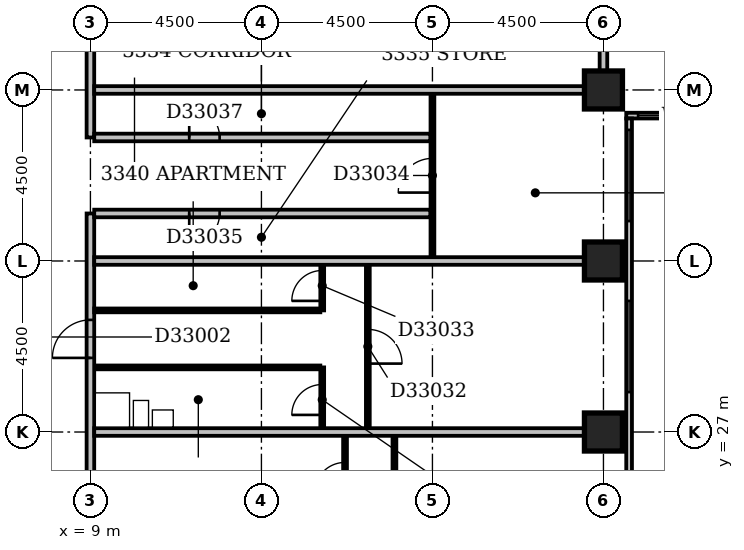
"""IFC4 building model, lengths in metres.
Left out: names, types, materials, properties, quantities, classifications, styles, units other than length and angle.
Written with IfcOpenShell. Run it as: python <this file> out.ifc"""

import sys

from ifc_helpers import new_model, si_unit, direction, frame, frame_2d, origin, origin_2d, place, context, subcontext, project, spatial, rectangle, extrude, element, fill, save


model = new_model("IFC4")
c1 = context("Model", 3, precision=1e-05, world=origin(), true_north=direction((0.0, 1.0)))
c2 = subcontext(c1, "Body", "Model", "MODEL_VIEW")
j1 = project(units=[si_unit("LENGTHUNIT", "METRE"), si_unit("PLANEANGLEUNIT", "RADIAN")], contexts=[c1])
p1 = place(None, origin())
s1 = spatial("IfcSite", under=j1, at=p1, CompositionType="ELEMENT")
p2 = place(p1, origin())
s2 = spatial("IfcBuilding", under=s1, at=p2, CompositionType="ELEMENT")
p3 = place(p2, frame((0.0, 0.0, 134.0)))
s3 = spatial("IfcBuildingStorey", under=s2, at=p3, CompositionType="ELEMENT", Elevation=134.0)
for number, where, z_axis, x_axis in (
    (1, (22.5, 27.0, -0.3), (0.0, 0.0, 1.0), (1.0, 0.0, 0.0)),
    (2, (22.5, 31.5, -0.3), (0.0, 0.0, 1.0), (1.0, 0.0, 0.0)),
    (3, (22.5, 36.0, -0.3), (0.0, 0.0, 1.0), (1.0, 0.0, 0.0)),
):
    element("IfcColumn", number, at=place(p3, frame(where, z_axis=z_axis, x_axis=x_axis)), inside=s3, PredefinedType="COLUMN", context=c2, shape_type="SweptSolid", body=[
        extrude(rectangle(XDim=1.0, YDim=1.0, at=origin_2d()), origin(), (0.0, 0.0, 1.0), 3.6),
    ])
p4 = place(p3, frame((23.175, 17.4, 0.0), z_axis=(0.0, 0.0, 1.0), x_axis=(0.0, 1.0, 0.0)))
e4 = element("IfcWall", 4, at=p4, inside=s3, PredefinedType="STANDARD", context=c2, shape_type="SweptSolid", body=[
    extrude(rectangle(XDim=17.85, YDim=0.15, at=frame_2d((8.925, 0.0))), origin(), (0.0, 0.0, 1.0), 2.7),
])
p5 = place(p4, frame((1.385, 0.0, 0.6)))
e5 = element("IfcOpeningElement", 5, at=p5, cuts=e4, PredefinedType="OPENING", context=c2, shape_type="SweptSolid", body=[
    extrude(rectangle(XDim=2.1, YDim=1.8, at=frame_2d((1.05, 0.9))), frame((0.0, 0.087, 0.0), z_axis=(0.0, -1.0, 0.0), x_axis=(1.0, 0.0, 0.0)), (0.0, 0.0, 1.0), 0.174),
])
p6 = place(p4, frame((6.15, 0.0, 0.6)))
e6 = element("IfcOpeningElement", 6, at=p6, cuts=e4, PredefinedType="OPENING", context=c2, shape_type="SweptSolid", body=[
    extrude(rectangle(XDim=2.4, YDim=1.8, at=frame_2d((1.2, 0.9))), frame((0.0, 0.087, 0.0), z_axis=(0.0, -1.0, 0.0), x_axis=(1.0, 0.0, 0.0)), (0.0, 0.0, 1.0), 0.174),
])
p7 = place(p4, frame((10.65, 0.0, 0.6)))
e7 = element("IfcOpeningElement", 7, at=p7, cuts=e4, PredefinedType="OPENING", context=c2, shape_type="SweptSolid", body=[
    extrude(rectangle(XDim=2.4, YDim=1.8, at=frame_2d((1.2, 0.9))), frame((0.0, 0.087, 0.0), z_axis=(0.0, -1.0, 0.0), x_axis=(1.0, 0.0, 0.0)), (0.0, 0.0, 1.0), 0.174),
])
p8 = place(p4, frame((15.15, 0.0, 0.6)))
e8 = element("IfcOpeningElement", 8, at=p8, cuts=e4, PredefinedType="OPENING", context=c2, shape_type="SweptSolid", body=[
    extrude(rectangle(XDim=2.4, YDim=1.8, at=frame_2d((1.2, 0.9))), frame((0.0, 0.087, 0.0), z_axis=(0.0, -1.0, 0.0), x_axis=(1.0, 0.0, 0.0)), (0.0, 0.0, 1.0), 0.174),
])
p9 = place(p3, frame((23.1, 35.325, 0.0), z_axis=(0.0, 0.0, 1.0), x_axis=(1.0, 0.0, 0.0)))
e9 = element("IfcWall", 9, at=p9, inside=s3, PredefinedType="STANDARD", context=c2, shape_type="SweptSolid", body=[
    extrude(rectangle(XDim=45.15, YDim=0.15, at=frame_2d((22.575, 0.0))), origin(), (0.0, 0.0, 1.0), 2.7),
])
p10 = place(p9, frame((0.312, 0.0, 0.6)))
e10 = element("IfcOpeningElement", 10, at=p10, cuts=e9, PredefinedType="OPENING", context=c2, shape_type="SweptSolid", body=[
    extrude(rectangle(XDim=2.1, YDim=1.8, at=frame_2d((1.05, 0.9))), frame((0.0, 0.087, 0.0), z_axis=(0.0, -1.0, 0.0), x_axis=(1.0, 0.0, 0.0)), (0.0, 0.0, 1.0), 0.174),
])
p11 = place(p9, frame((4.95, 0.0, 0.6)))
e11 = element("IfcOpeningElement", 11, at=p11, cuts=e9, PredefinedType="OPENING", context=c2, shape_type="SweptSolid", body=[
    extrude(rectangle(XDim=2.4, YDim=1.8, at=frame_2d((1.2, 0.9))), frame((0.0, 0.087, 0.0), z_axis=(0.0, -1.0, 0.0), x_axis=(1.0, 0.0, 0.0)), (0.0, 0.0, 1.0), 0.174),
])
p12 = place(p9, frame((9.45, 0.0, 0.6)))
e12 = element("IfcOpeningElement", 12, at=p12, cuts=e9, PredefinedType="OPENING", context=c2, shape_type="SweptSolid", body=[
    extrude(rectangle(XDim=2.4, YDim=1.8, at=frame_2d((1.2, 0.9))), frame((0.0, 0.087, 0.0), z_axis=(0.0, -1.0, 0.0), x_axis=(1.0, 0.0, 0.0)), (0.0, 0.0, 1.0), 0.174),
])
p13 = place(p9, frame((13.95, 0.0, 0.6)))
e13 = element("IfcOpeningElement", 13, at=p13, cuts=e9, PredefinedType="OPENING", context=c2, shape_type="SweptSolid", body=[
    extrude(rectangle(XDim=2.4, YDim=1.8, at=frame_2d((1.2, 0.9))), frame((0.0, 0.087, 0.0), z_axis=(0.0, -1.0, 0.0), x_axis=(1.0, 0.0, 0.0)), (0.0, 0.0, 1.0), 0.174),
])
p14 = place(p9, frame((18.45, 0.0, 0.6)))
e14 = element("IfcOpeningElement", 14, at=p14, cuts=e9, PredefinedType="OPENING", context=c2, shape_type="SweptSolid", body=[
    extrude(rectangle(XDim=2.4, YDim=1.8, at=frame_2d((1.2, 0.9))), frame((0.0, 0.087, 0.0), z_axis=(0.0, -1.0, 0.0), x_axis=(1.0, 0.0, 0.0)), (0.0, 0.0, 1.0), 0.174),
])
p15 = place(p9, frame((24.146, 0.0, 0.6)))
e15 = element("IfcOpeningElement", 15, at=p15, cuts=e9, PredefinedType="OPENING", context=c2, shape_type="SweptSolid", body=[
    extrude(rectangle(XDim=1.5, YDim=1.8, at=frame_2d((0.75, 0.9))), frame((0.0, 0.087, 0.0), z_axis=(0.0, -1.0, 0.0), x_axis=(1.0, 0.0, 0.0)), (0.0, 0.0, 1.0), 0.174),
])
p16 = place(p9, frame((27.131, 0.0, 0.6)))
e16 = element("IfcOpeningElement", 16, at=p16, cuts=e9, PredefinedType="OPENING", context=c2, shape_type="SweptSolid", body=[
    extrude(rectangle(XDim=2.4, YDim=1.8, at=frame_2d((1.2, 0.9))), frame((0.0, 0.087, 0.0), z_axis=(0.0, -1.0, 0.0), x_axis=(1.0, 0.0, 0.0)), (0.0, 0.0, 1.0), 0.174),
])
p17 = place(p9, frame((31.95, 0.0, 0.6)))
e17 = element("IfcOpeningElement", 17, at=p17, cuts=e9, PredefinedType="OPENING", context=c2, shape_type="SweptSolid", body=[
    extrude(rectangle(XDim=2.4, YDim=1.8, at=frame_2d((1.2, 0.9))), frame((0.0, 0.087, 0.0), z_axis=(0.0, -1.0, 0.0), x_axis=(1.0, 0.0, 0.0)), (0.0, 0.0, 1.0), 0.174),
])
p18 = place(p9, frame((36.45, 0.0, 0.6)))
e18 = element("IfcOpeningElement", 18, at=p18, cuts=e9, PredefinedType="OPENING", context=c2, shape_type="SweptSolid", body=[
    extrude(rectangle(XDim=2.4, YDim=1.8, at=frame_2d((1.2, 0.9))), frame((0.0, 0.087, 0.0), z_axis=(0.0, -1.0, 0.0), x_axis=(1.0, 0.0, 0.0)), (0.0, 0.0, 1.0), 0.174),
])
p19 = place(p9, frame((40.95, 0.0, 0.6)))
e19 = element("IfcOpeningElement", 19, at=p19, cuts=e9, PredefinedType="OPENING", context=c2, shape_type="SweptSolid", body=[
    extrude(rectangle(XDim=2.4, YDim=1.8, at=frame_2d((1.2, 0.9))), frame((0.0, 0.087, 0.0), z_axis=(0.0, -1.0, 0.0), x_axis=(1.0, 0.0, 0.0)), (0.0, 0.0, 1.0), 0.174),
])
p20 = place(p3, frame((9.0, 5.0, 0.0), z_axis=(0.0, 0.0, 1.0), x_axis=(0.0, 1.0, 0.0)))
e20 = element("IfcWall", 20, at=p20, inside=s3, PredefinedType="PARTITIONING", context=c2, shape_type="SweptSolid", body=[
    extrude(rectangle(XDim=27.75, YDim=0.2, at=frame_2d((13.875, 0.0))), origin(), (0.0, 0.0, 1.0), 3.3),
])
p21 = place(p20, frame((23.95, 0.0, 0.0)))
e21 = element("IfcOpeningElement", 21, at=p21, cuts=e20, PredefinedType="OPENING", context=c2, shape_type="SweptSolid", body=[
    extrude(rectangle(XDim=1.0, YDim=2.1, at=frame_2d((0.5, 1.05))), frame((0.0, 0.112, 0.0), z_axis=(0.0, -1.0, 0.0), x_axis=(1.0, 0.0, 0.0)), (0.0, 0.0, 1.0), 0.224),
])
p22 = place(p20, frame((13.3, 0.0, 0.0)))
e22 = element("IfcOpeningElement", 22, at=p22, cuts=e20, PredefinedType="OPENING", context=c2, shape_type="SweptSolid", body=[
    extrude(rectangle(XDim=1.0, YDim=2.1, at=frame_2d((0.5, 1.05))), frame((0.0, 0.112, 0.0), z_axis=(0.0, -1.0, 0.0), x_axis=(1.0, 0.0, 0.0)), (0.0, 0.0, 1.0), 0.224),
])
p23 = place(p20, frame((11.7, 0.0, 0.0)))
e23 = element("IfcOpeningElement", 23, at=p23, cuts=e20, PredefinedType="OPENING", context=c2, shape_type="SweptSolid", body=[
    extrude(rectangle(XDim=1.0, YDim=2.1, at=frame_2d((0.5, 1.05))), frame((0.0, 0.112, 0.0), z_axis=(0.0, -1.0, 0.0), x_axis=(1.0, 0.0, 0.0)), (0.0, 0.0, 1.0), 0.224),
])
p24 = place(p20, frame((1.5, 0.0, 0.0)))
e24 = element("IfcOpeningElement", 24, at=p24, cuts=e20, PredefinedType="OPENING", context=c2, shape_type="SweptSolid", body=[
    extrude(rectangle(XDim=0.9, YDim=2.1, at=frame_2d((0.45, 1.05))), frame((0.0, 0.112, 0.0), z_axis=(0.0, -1.0, 0.0), x_axis=(1.0, 0.0, 0.0)), (0.0, 0.0, 1.0), 0.224),
])
p25 = place(p3, frame((17.0, 18.1, 0.0), z_axis=(0.0, 0.0, 1.0), x_axis=(0.0, 1.0, 0.0)))
e25 = element("IfcWall", 25, at=p25, inside=s3, PredefinedType="PARTITIONING", context=c2, shape_type="SweptSolid", body=[
    extrude(rectangle(XDim=8.8, YDim=0.1, at=frame_2d((4.4, 0.0))), origin(), (0.0, 0.0, 1.0), 3.3),
])
p26 = place(p25, frame((1.7, 0.0, 0.0)))
e26 = element("IfcOpeningElement", 26, at=p26, cuts=e25, PredefinedType="OPENING", context=c2, shape_type="SweptSolid", body=[
    extrude(rectangle(XDim=0.9, YDim=2.1, at=frame_2d((0.45, 1.05))), frame((0.0, 0.062, 0.0), z_axis=(0.0, -1.0, 0.0), x_axis=(1.0, 0.0, 0.0)), (0.0, 0.0, 1.0), 0.124),
])
p27 = place(p25, frame((6.2, 0.0, 0.0)))
e27 = element("IfcOpeningElement", 27, at=p27, cuts=e25, PredefinedType="OPENING", context=c2, shape_type="SweptSolid", body=[
    extrude(rectangle(XDim=0.9, YDim=2.1, at=frame_2d((0.45, 1.05))), frame((0.0, 0.062, 0.0), z_axis=(0.0, -1.0, 0.0), x_axis=(1.0, 0.0, 0.0)), (0.0, 0.0, 1.0), 0.124),
])
p28 = place(p3, frame((15.7, 19.6, 0.0), z_axis=(0.0, 0.0, 1.0), x_axis=(0.0, 1.0, 0.0)))
e28 = element("IfcWall", 28, at=p28, inside=s3, PredefinedType="PARTITIONING", context=c2, shape_type="SweptSolid", body=[
    extrude(rectangle(XDim=7.3, YDim=0.1, at=frame_2d((3.65, 0.0))), origin(), (0.0, 0.0, 1.0), 3.3),
])
p29 = place(p28, frame((5.8, 0.0, 0.0)))
e29 = element("IfcOpeningElement", 29, at=p29, cuts=e28, PredefinedType="OPENING", context=c2, shape_type="SweptSolid", body=[
    extrude(rectangle(XDim=0.8, YDim=2.1, at=frame_2d((0.4, 1.05))), frame((0.0, 0.062, 0.0), z_axis=(0.0, -1.0, 0.0), x_axis=(1.0, 0.0, 0.0)), (0.0, 0.0, 1.0), 0.124),
])
p30 = place(p28, frame((2.05, 0.0, 0.0)))
e30 = element("IfcOpeningElement", 30, at=p30, cuts=e28, PredefinedType="OPENING", context=c2, shape_type="SweptSolid", body=[
    extrude(rectangle(XDim=0.9, YDim=2.1, at=frame_2d((0.45, 1.05))), frame((0.0, 0.062, 0.0), z_axis=(0.0, -1.0, 0.0), x_axis=(1.0, 0.0, 0.0)), (0.0, 0.0, 1.0), 0.124),
])
p31 = place(p3, frame((9.1, 27.0, 0.0), z_axis=(0.0, 0.0, 1.0), x_axis=(1.0, 0.0, 0.0)))
e31 = element("IfcWall", 31, at=p31, inside=s3, PredefinedType="PARTITIONING", context=c2, shape_type="SweptSolid", body=[
    extrude(rectangle(XDim=12.9, YDim=0.2, at=frame_2d((6.45, 0.0))), origin(), (0.0, 0.0, 1.0), 2.7),
])
p32 = place(p3, frame((15.1, 27.1, 0.0), z_axis=(0.0, 0.0, 1.0), x_axis=(0.0, 1.0, 0.0)))
e32 = element("IfcWall", 32, at=p32, inside=s3, PredefinedType="PARTITIONING", context=c2, shape_type="SweptSolid", body=[
    extrude(rectangle(XDim=1.6, YDim=0.1, at=frame_2d((0.8, 0.0))), origin(), (0.0, 0.0, 1.0), 3.3),
])
p33 = place(p32, frame((0.35, 0.0, 0.0)))
e33 = element("IfcOpeningElement", 33, at=p33, cuts=e32, PredefinedType="OPENING", context=c2, shape_type="SweptSolid", body=[
    extrude(rectangle(XDim=0.8, YDim=2.1, at=frame_2d((0.4, 1.05))), frame((0.0, 0.062, 0.0), z_axis=(0.0, -1.0, 0.0), x_axis=(1.0, 0.0, 0.0)), (0.0, 0.0, 1.0), 0.124),
])
p34 = place(p3, frame((16.3, 27.1, 0.0), z_axis=(0.0, 0.0, 1.0), x_axis=(0.0, 1.0, 0.0)))
e34 = element("IfcWall", 34, at=p34, inside=s3, PredefinedType="PARTITIONING", context=c2, shape_type="SweptSolid", body=[
    extrude(rectangle(XDim=4.3, YDim=0.1, at=frame_2d((2.15, 0.0))), origin(), (0.0, 0.0, 1.0), 3.3),
])
p35 = place(p34, frame((1.7, 0.0, 0.0)))
e35 = element("IfcOpeningElement", 35, at=p35, cuts=e34, PredefinedType="OPENING", context=c2, shape_type="SweptSolid", body=[
    extrude(rectangle(XDim=0.9, YDim=2.1, at=frame_2d((0.45, 1.05))), frame((0.0, 0.062, 0.0), z_axis=(0.0, -1.0, 0.0), x_axis=(1.0, 0.0, 0.0)), (0.0, 0.0, 1.0), 0.124),
])
p36 = place(p3, frame((9.1, 28.7, 0.0), z_axis=(0.0, 0.0, 1.0), x_axis=(1.0, 0.0, 0.0)))
e36 = element("IfcWall", 36, at=p36, inside=s3, PredefinedType="PLUMBINGWALL", context=c2, shape_type="SweptSolid", body=[
    extrude(rectangle(XDim=5.95, YDim=0.1, at=frame_2d((2.975, 0.0))), origin(), (0.0, 0.0, 1.0), 3.3),
])
p37 = place(p3, frame((9.1, 30.2, 0.0), z_axis=(0.0, 0.0, 1.0), x_axis=(1.0, 0.0, 0.0)))
e37 = element("IfcWall", 37, at=p37, inside=s3, PredefinedType="PARTITIONING", context=c2, shape_type="SweptSolid", body=[
    extrude(rectangle(XDim=5.95, YDim=0.1, at=frame_2d((2.975, 0.0))), origin(), (0.0, 0.0, 1.0), 3.3),
])
p38 = place(p3, frame((15.1, 30.2, 0.0), z_axis=(0.0, 0.0, 1.0), x_axis=(0.0, 1.0, 0.0)))
e38 = element("IfcWall", 38, at=p38, inside=s3, PredefinedType="PARTITIONING", context=c2, shape_type="SweptSolid", body=[
    extrude(rectangle(XDim=1.2, YDim=0.1, at=frame_2d((0.6, 0.0))), origin(), (0.0, 0.0, 1.0), 3.3),
])
p39 = place(p38, frame((0.25, 0.0, 0.0)))
e39 = element("IfcOpeningElement", 39, at=p39, cuts=e38, PredefinedType="OPENING", context=c2, shape_type="SweptSolid", body=[
    extrude(rectangle(XDim=0.8, YDim=2.1, at=frame_2d((0.4, 1.05))), frame((0.0, 0.062, 0.0), z_axis=(0.0, -1.0, 0.0), x_axis=(1.0, 0.0, 0.0)), (0.0, 0.0, 1.0), 0.124),
])
p40 = place(p3, frame((9.1, 31.5, 0.0), z_axis=(0.0, 0.0, 1.0), x_axis=(1.0, 0.0, 0.0)))
e40 = element("IfcWall", 40, at=p40, inside=s3, PredefinedType="PARTITIONING", context=c2, shape_type="SweptSolid", body=[
    extrude(rectangle(XDim=12.9, YDim=0.2, at=frame_2d((6.45, 0.0))), origin(), (0.0, 0.0, 1.0), 3.3),
])
p41 = place(p3, frame((18.0, 31.6, 0.0), z_axis=(0.0, 0.0, 1.0), x_axis=(0.0, 1.0, 0.0)))
e41 = element("IfcWall", 41, at=p41, inside=s3, PredefinedType="PARTITIONING", context=c2, shape_type="SweptSolid", body=[
    extrude(rectangle(XDim=4.3, YDim=0.1, at=frame_2d((2.15, 0.0))), origin(), (0.0, 0.0, 1.0), 3.3),
])
p42 = place(p41, frame((1.7, 0.0, 0.0)))
e42 = element("IfcOpeningElement", 42, at=p42, cuts=e41, PredefinedType="OPENING", context=c2, shape_type="SweptSolid", body=[
    extrude(rectangle(XDim=0.9, YDim=2.1, at=frame_2d((0.45, 1.05))), frame((0.0, 0.062, 0.0), z_axis=(0.0, -1.0, 0.0), x_axis=(1.0, 0.0, 0.0)), (0.0, 0.0, 1.0), 0.124),
])
p43 = place(p3, frame((9.1, 32.75, 0.0), z_axis=(0.0, 0.0, 1.0), x_axis=(1.0, 0.0, 0.0)))
e43 = element("IfcWall", 43, at=p43, inside=s3, PredefinedType="PARTITIONING", context=c2, shape_type="SweptSolid", body=[
    extrude(rectangle(XDim=8.85, YDim=0.2, at=frame_2d((4.425, 0.0))), origin(), (0.0, 0.0, 1.0), 3.3),
])
p44 = place(p43, frame((2.5, 0.0, 0.0)))
e44 = element("IfcOpeningElement", 44, at=p44, cuts=e43, PredefinedType="OPENING", context=c2, shape_type="SweptSolid", body=[
    extrude(rectangle(XDim=0.8, YDim=2.1, at=frame_2d((0.4, 1.05))), frame((0.0, 0.112, 0.0), z_axis=(0.0, -1.0, 0.0), x_axis=(1.0, 0.0, 0.0)), (0.0, 0.0, 1.0), 0.224),
])
p45 = place(p3, frame((9.0, 34.75, 0.0), z_axis=(0.0, 0.0, 1.0), x_axis=(0.0, 1.0, 0.0)))
e45 = element("IfcWall", 45, at=p45, inside=s3, PredefinedType="PARTITIONING", context=c2, shape_type="SweptSolid", body=[
    extrude(rectangle(XDim=14.75, YDim=0.2, at=frame_2d((7.375, 0.0))), origin(), (0.0, 0.0, 1.0), 3.3),
])
p46 = place(p45, frame((5.25, 0.0, 0.0)))
e46 = element("IfcOpeningElement", 46, at=p46, cuts=e45, PredefinedType="OPENING", context=c2, shape_type="SweptSolid", body=[
    extrude(rectangle(XDim=0.9, YDim=2.1, at=frame_2d((0.45, 1.05))), frame((0.0, 0.112, 0.0), z_axis=(0.0, -1.0, 0.0), x_axis=(1.0, 0.0, 0.0)), (0.0, 0.0, 1.0), 0.224),
])
p47 = place(p3, frame((9.1, 34.75, 0.0), z_axis=(0.0, 0.0, 1.0), x_axis=(1.0, 0.0, 0.0)))
e47 = element("IfcWall", 47, at=p47, inside=s3, PredefinedType="PARTITIONING", context=c2, shape_type="SweptSolid", body=[
    extrude(rectangle(XDim=8.85, YDim=0.2, at=frame_2d((4.425, 0.0))), origin(), (0.0, 0.0, 1.0), 3.3),
])
p48 = place(p47, frame((2.5, 0.0, 0.0)))
e48 = element("IfcOpeningElement", 48, at=p48, cuts=e47, PredefinedType="OPENING", context=c2, shape_type="SweptSolid", body=[
    extrude(rectangle(XDim=0.8, YDim=2.1, at=frame_2d((0.4, 1.05))), frame((0.0, 0.112, 0.0), z_axis=(0.0, -1.0, 0.0), x_axis=(1.0, 0.0, 0.0)), (0.0, 0.0, 1.0), 0.224),
])
for number, where, z_axis, x_axis in (
    (49, (9.1, 36.0, 0.0), (0.0, 0.0, 1.0), (1.0, 0.0, 0.0)),
    (50, (22.5, 36.5, 0.0), (0.0, 0.0, 1.0), (0.0, 1.0, 0.0)),
):
    element("IfcWall", number, at=place(p3, frame(where, z_axis=z_axis, x_axis=x_axis)), inside=s3, PredefinedType="PARTITIONING", context=c2, shape_type="SweptSolid", body=[
        extrude(rectangle(XDim=12.9, YDim=0.2, at=frame_2d((6.45, 0.0))), origin(), (0.0, 0.0, 1.0), 3.3),
    ])
p49 = place(p7, origin())
e51 = element("IfcWindow", 51, at=p49, inside=s3, PartitioningType="SINGLE_PANEL", PredefinedType="WINDOW", context=c2, shape_type="SweptSolid", body=[
    extrude(rectangle(XDim=2.4, YDim=1.8, at=frame_2d((1.2, 0.9))), frame((0.0, 0.03, 0.0), z_axis=(0.0, -1.0, 0.0), x_axis=(1.0, 0.0, 0.0)), (0.0, 0.0, 1.0), 0.06),
])
fill(e7, e51)
p50 = place(p8, origin())
e52 = element("IfcWindow", 52, at=p50, inside=s3, PartitioningType="SINGLE_PANEL", PredefinedType="WINDOW", context=c2, shape_type="SweptSolid", body=[
    extrude(rectangle(XDim=2.4, YDim=1.8, at=frame_2d((1.2, 0.9))), frame((0.0, 0.03, 0.0), z_axis=(0.0, -1.0, 0.0), x_axis=(1.0, 0.0, 0.0)), (0.0, 0.0, 1.0), 0.06),
])
fill(e8, e52)
p51 = place(p10, origin())
e53 = element("IfcWindow", 53, at=p51, inside=s3, PartitioningType="SINGLE_PANEL", PredefinedType="WINDOW", context=c2, shape_type="SweptSolid", body=[
    extrude(rectangle(XDim=2.1, YDim=1.8, at=frame_2d((1.05, 0.9))), frame((0.0, 0.03, 0.0), z_axis=(0.0, -1.0, 0.0), x_axis=(1.0, 0.0, 0.0)), (0.0, 0.0, 1.0), 0.06),
])
fill(e10, e53)
p52 = place(p21, origin())
e54 = element("IfcDoor", 54, at=p52, inside=s3, OperationType="SINGLE_SWING_LEFT", PredefinedType="DOOR", context=c2, shape_type="SweptSolid", body=[
    extrude(rectangle(XDim=1.0, YDim=2.1, at=frame_2d((0.5, 1.05))), frame((0.0, 0.025, 0.0), z_axis=(0.0, -1.0, 0.0), x_axis=(1.0, 0.0, 0.0)), (0.0, 0.0, 1.0), 0.05),
])
fill(e21, e54)
p53 = place(p29, origin())
e55 = element("IfcDoor", 55, at=p53, inside=s3, OperationType="SINGLE_SWING_LEFT", PredefinedType="DOOR", context=c2, shape_type="SweptSolid", body=[
    extrude(rectangle(XDim=0.8, YDim=2.1, at=frame_2d((0.4, 1.05))), frame((0.0, 0.025, 0.0), z_axis=(0.0, -1.0, 0.0), x_axis=(1.0, 0.0, 0.0)), (0.0, 0.0, 1.0), 0.05),
])
fill(e29, e55)
p54 = place(p33, origin())
e56 = element("IfcDoor", 56, at=p54, inside=s3, OperationType="SINGLE_SWING_LEFT", PredefinedType="DOOR", context=c2, shape_type="SweptSolid", body=[
    extrude(rectangle(XDim=0.8, YDim=2.1, at=frame_2d((0.4, 1.05))), frame((0.0, 0.025, 0.0), z_axis=(0.0, -1.0, 0.0), x_axis=(1.0, 0.0, 0.0)), (0.0, 0.0, 1.0), 0.05),
])
fill(e33, e56)
p55 = place(p35, frame((0.9, 0.0, 0.0), z_axis=(0.0, 0.0, 1.0), x_axis=(-1.0, 0.0, 0.0)))
e57 = element("IfcDoor", 57, at=p55, inside=s3, OperationType="SINGLE_SWING_RIGHT", PredefinedType="DOOR", context=c2, shape_type="SweptSolid", body=[
    extrude(rectangle(XDim=0.9, YDim=2.1, at=frame_2d((0.45, 1.05))), frame((0.0, 0.025, 0.0), z_axis=(0.0, -1.0, 0.0), x_axis=(1.0, 0.0, 0.0)), (0.0, 0.0, 1.0), 0.05),
])
fill(e35, e57)
p56 = place(p39, origin())
e58 = element("IfcDoor", 58, at=p56, inside=s3, OperationType="SINGLE_SWING_LEFT", PredefinedType="DOOR", context=c2, shape_type="SweptSolid", body=[
    extrude(rectangle(XDim=0.8, YDim=2.1, at=frame_2d((0.4, 1.05))), frame((0.0, 0.025, 0.0), z_axis=(0.0, -1.0, 0.0), x_axis=(1.0, 0.0, 0.0)), (0.0, 0.0, 1.0), 0.05),
])
fill(e39, e58)
p57 = place(p42, origin())
e59 = element("IfcDoor", 59, at=p57, inside=s3, OperationType="SINGLE_SWING_LEFT", PredefinedType="DOOR", context=c2, shape_type="SweptSolid", body=[
    extrude(rectangle(XDim=0.9, YDim=2.1, at=frame_2d((0.45, 1.05))), frame((0.0, 0.025, 0.0), z_axis=(0.0, -1.0, 0.0), x_axis=(1.0, 0.0, 0.0)), (0.0, 0.0, 1.0), 0.05),
])
fill(e42, e59)
p58 = place(p44, frame((0.8, 0.0, 0.0), z_axis=(0.0, 0.0, 1.0), x_axis=(-1.0, 0.0, 0.0)))
e60 = element("IfcDoor", 60, at=p58, inside=s3, OperationType="SINGLE_SWING_RIGHT", PredefinedType="DOOR", context=c2, shape_type="SweptSolid", body=[
    extrude(rectangle(XDim=0.8, YDim=2.1, at=frame_2d((0.4, 1.05))), frame((0.0, 0.025, 0.0), z_axis=(0.0, -1.0, 0.0), x_axis=(1.0, 0.0, 0.0)), (0.0, 0.0, 1.0), 0.05),
])
fill(e44, e60)
p59 = place(p48, origin())
e61 = element("IfcDoor", 61, at=p59, inside=s3, OperationType="SINGLE_SWING_LEFT", PredefinedType="DOOR", context=c2, shape_type="SweptSolid", body=[
    extrude(rectangle(XDim=0.8, YDim=2.1, at=frame_2d((0.4, 1.05))), frame((0.0, 0.025, 0.0), z_axis=(0.0, -1.0, 0.0), x_axis=(1.0, 0.0, 0.0)), (0.0, 0.0, 1.0), 0.05),
])
fill(e48, e61)
save(model, sys.argv[1])
